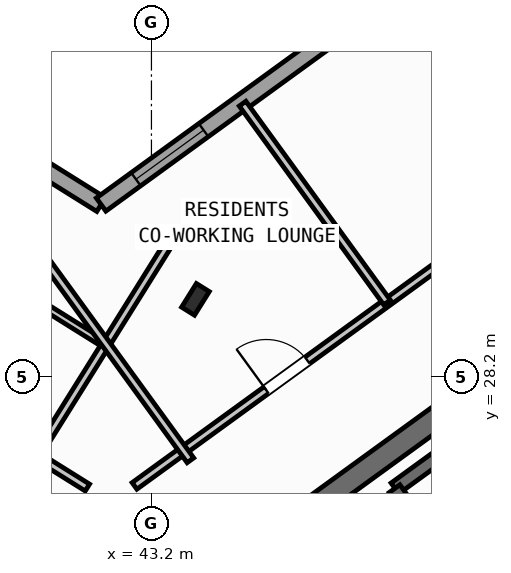
"""IFC4 building model, lengths in metres.
Left out: names, types, materials, properties, quantities, classifications, styles, units other than length and angle.
Written with IfcOpenShell. Run it as: python <this file> out.ifc"""

import sys

from ifc_helpers import new_model, si_unit, direction, frame, frame_2d, origin, origin_2d, place, context, subcontext, project, spatial, rectangle, i_section, extrude, source, transform, mapped, element, fill, save


model = new_model("IFC4")
c1 = context("Model", 3, precision=1e-05, world=origin(), true_north=direction((0.0, 1.0)))
c2 = subcontext(c1, "Body", "Model", "MODEL_VIEW")
j1 = project(units=[si_unit("LENGTHUNIT", "METRE"), si_unit("PLANEANGLEUNIT", "RADIAN")], contexts=[c1])
p1 = place(None, origin())
s1 = spatial("IfcSite", under=j1, at=p1, CompositionType="ELEMENT")
p2 = place(p1, origin())
s2 = spatial("IfcBuilding", under=s1, at=p2, CompositionType="ELEMENT")
p3 = place(p2, frame((0.0, 0.0, 229.2)))
s3 = spatial("IfcBuildingStorey", under=s2, at=p3, CompositionType="ELEMENT", Elevation=229.2)
p4 = place(p3, frame((44.406, 24.172, 0.0), z_axis=(0.0, 0.0, 1.0), x_axis=(0.809012867805, 0.587790931986, 0.0)))
e1 = element("IfcWall", 1, at=p4, inside=s3, PredefinedType="SHEAR", context=c2, shape_type="SweptSolid", body=[
    extrude(rectangle(XDim=12.24, YDim=0.45, at=frame_2d((6.12, 0.0))), origin(), (0.0, 0.0, 1.0), 4.22),
])
m1 = source(origin(), c2, "Body", "SweptSolid", [
    extrude(i_section(OverallWidth=0.3, OverallDepth=0.55, WebThickness=0.015, FlangeThickness=0.029, at=origin_2d()), origin(), (0.0, 0.0, 1.0), 4.5),
])
p5 = place(p3, frame((44.068, 29.726, 0.0), z_axis=(0.0, 0.0, 1.0), x_axis=(-0.848048096156, 0.529919264233, 0.0)))
e2 = element("IfcColumn", 2, at=p5, inside=s3, PredefinedType="COLUMN", context=c2, shape_type="MappedRepresentation", body=[
    mapped(m1, transform((0.0, 0.0, 0.0), scale=1.0)),
])
p6 = place(p3, frame((17.424, 47.083, 0.0), z_axis=(0.0, 0.0, 1.0), x_axis=(0.848049927979, -0.529916332693, 0.0)))
e3 = element("IfcWall", 3, at=p6, inside=s3, PredefinedType="STANDARD", context=c2, shape_type="SweptSolid", body=[
    extrude(rectangle(XDim=29.223, YDim=0.32, at=frame_2d((14.612, 0.0))), origin(), (0.0, 0.0, 1.0), 4.22),
])
p7 = place(p6, frame((3.709, 0.0, 0.0)))
e4 = element("IfcOpeningElement", 4, at=p7, cuts=e3, PredefinedType="OPENING", context=c2, shape_type="SweptSolid", body=[
    extrude(rectangle(XDim=1.05, YDim=2.15, at=frame_2d((0.525, 1.075))), frame((0.0, 0.17, 0.0), z_axis=(0.0, -1.0, 0.0), x_axis=(1.0, 0.0, 0.0)), (0.0, 0.0, 1.0), 0.34),
])
p8 = place(p6, frame((0.809, 0.0, 1.0)))
e5 = element("IfcOpeningElement", 5, at=p8, cuts=e3, PredefinedType="OPENING", context=c2, shape_type="SweptSolid", body=[
    extrude(rectangle(XDim=0.9, YDim=1.25, at=frame_2d((0.45, 0.625))), frame((0.0, 0.17, 0.0), z_axis=(0.0, -1.0, 0.0), x_axis=(1.0, 0.0, 0.0)), (0.0, 0.0, 1.0), 0.34),
])
p9 = place(p6, frame((13.811, 0.0, 0.9)))
e6 = element("IfcOpeningElement", 6, at=p9, cuts=e3, PredefinedType="OPENING", context=c2, shape_type="SweptSolid", body=[
    extrude(rectangle(XDim=1.35, YDim=1.45, at=frame_2d((0.675, 0.725))), frame((0.0, 0.17, 0.0), z_axis=(0.0, -1.0, 0.0), x_axis=(1.0, 0.0, 0.0)), (0.0, 0.0, 1.0), 0.34),
])
p10 = place(p6, frame((17.254, 0.0, 1.0)))
e7 = element("IfcOpeningElement", 7, at=p10, cuts=e3, PredefinedType="OPENING", context=c2, shape_type="SweptSolid", body=[
    extrude(rectangle(XDim=0.9, YDim=1.25, at=frame_2d((0.45, 0.625))), frame((0.0, 0.17, 0.0), z_axis=(0.0, -1.0, 0.0), x_axis=(1.0, 0.0, 0.0)), (0.0, 0.0, 1.0), 0.34),
])
p11 = place(p6, frame((21.364, 0.0, 1.0)))
e8 = element("IfcOpeningElement", 8, at=p11, cuts=e3, PredefinedType="OPENING", context=c2, shape_type="SweptSolid", body=[
    extrude(rectangle(XDim=0.9, YDim=1.25, at=frame_2d((0.45, 0.625))), frame((0.0, 0.17, 0.0), z_axis=(0.0, -1.0, 0.0), x_axis=(1.0, 0.0, 0.0)), (0.0, 0.0, 1.0), 0.34),
])
p12 = place(p6, frame((26.003, 0.0, 1.0)))
e9 = element("IfcOpeningElement", 9, at=p12, cuts=e3, PredefinedType="OPENING", context=c2, shape_type="SweptSolid", body=[
    extrude(rectangle(XDim=0.9, YDim=1.25, at=frame_2d((0.45, 0.625))), frame((0.0, 0.17, 0.0), z_axis=(0.0, -1.0, 0.0), x_axis=(1.0, 0.0, 0.0)), (0.0, 0.0, 1.0), 0.34),
])
p13 = place(p6, frame((11.211, 0.0, 1.0)))
e10 = element("IfcOpeningElement", 10, at=p13, cuts=e3, PredefinedType="OPENING", context=c2, shape_type="SweptSolid", body=[
    extrude(rectangle(XDim=0.65, YDim=1.15, at=frame_2d((0.325, 0.575))), frame((0.0, 0.17, 0.0), z_axis=(0.0, -1.0, 0.0), x_axis=(1.0, 0.0, 0.0)), (0.0, 0.0, 1.0), 0.34),
])
p14 = place(p6, frame((9.079, 0.0, 1.0)))
e11 = element("IfcOpeningElement", 11, at=p14, cuts=e3, PredefinedType="OPENING", context=c2, shape_type="SweptSolid", body=[
    extrude(rectangle(XDim=0.65, YDim=1.15, at=frame_2d((0.325, 0.575))), frame((0.0, 0.17, 0.0), z_axis=(0.0, -1.0, 0.0), x_axis=(1.0, 0.0, 0.0)), (0.0, 0.0, 1.0), 0.34),
])
p15 = place(p6, frame((6.951, 0.0, 1.0)))
e12 = element("IfcOpeningElement", 12, at=p15, cuts=e3, PredefinedType="OPENING", context=c2, shape_type="SweptSolid", body=[
    extrude(rectangle(XDim=0.65, YDim=1.15, at=frame_2d((0.325, 0.575))), frame((0.0, 0.17, 0.0), z_axis=(0.0, -1.0, 0.0), x_axis=(1.0, 0.0, 0.0)), (0.0, 0.0, 1.0), 0.34),
])
p16 = place(p3, frame((42.207, 31.597, 0.0), z_axis=(0.0, 0.0, 1.0), x_axis=(0.809020333377, 0.587780656523, 0.0)))
e13 = element("IfcWall", 13, at=p16, inside=s3, PredefinedType="STANDARD", context=c2, shape_type="SweptSolid", body=[
    extrude(rectangle(XDim=15.223, YDim=0.32, at=frame_2d((7.611, 0.0))), origin(), (0.0, 0.0, 1.0), 4.22),
])
p17 = place(p16, frame((12.82, 0.0, 0.0)))
e14 = element("IfcOpeningElement", 14, at=p17, cuts=e13, PredefinedType="OPENING", context=c2, shape_type="SweptSolid", body=[
    extrude(rectangle(XDim=1.05, YDim=2.15, at=frame_2d((0.525, 1.075))), frame((0.0, 0.17, 0.0), z_axis=(0.0, -1.0, 0.0), x_axis=(1.0, 0.0, 0.0)), (0.0, 0.0, 1.0), 0.34),
])
p18 = place(p16, frame((0.85, 0.0, 0.9)))
e15 = element("IfcOpeningElement", 15, at=p18, cuts=e13, PredefinedType="OPENING", context=c2, shape_type="SweptSolid", body=[
    extrude(rectangle(XDim=1.65, YDim=1.45, at=frame_2d((0.825, 0.725))), frame((0.0, 0.17, 0.0), z_axis=(0.0, -1.0, 0.0), x_axis=(1.0, 0.0, 0.0)), (0.0, 0.0, 1.0), 0.34),
])
p19 = place(p16, frame((5.769, 0.0, 0.9)))
e16 = element("IfcOpeningElement", 16, at=p19, cuts=e13, PredefinedType="OPENING", context=c2, shape_type="SweptSolid", body=[
    extrude(rectangle(XDim=1.35, YDim=1.45, at=frame_2d((0.675, 0.725))), frame((0.0, 0.17, 0.0), z_axis=(0.0, -1.0, 0.0), x_axis=(1.0, 0.0, 0.0)), (0.0, 0.0, 1.0), 0.34),
])
p20 = place(p16, frame((10.219, 0.0, 1.0)))
e17 = element("IfcOpeningElement", 17, at=p20, cuts=e13, PredefinedType="OPENING", context=c2, shape_type="SweptSolid", body=[
    extrude(rectangle(XDim=0.9, YDim=1.25, at=frame_2d((0.45, 0.625))), frame((0.0, 0.17, 0.0), z_axis=(0.0, -1.0, 0.0), x_axis=(1.0, 0.0, 0.0)), (0.0, 0.0, 1.0), 0.34),
])
p21 = place(p3, frame((48.006, 25.996, 0.0), z_axis=(0.0, 0.0, 1.0), x_axis=(0.80901903764, 0.587782439969, 0.0)))
e18 = element("IfcWall", 18, at=p21, inside=s3, PredefinedType="SHEAR", context=c2, shape_type="SweptSolid", body=[
    extrude(rectangle(XDim=7.46, YDim=0.26, at=frame_2d((3.73, 0.0))), origin(), (0.0, 0.0, 1.0), 4.22),
])
p22 = place(p3, frame((49.855, 23.434, 0.0), z_axis=(0.0, 0.0, 1.0), x_axis=(-0.58776738483, 0.809029975545, 0.0)))
e19 = element("IfcWall", 19, at=p22, inside=s3, PredefinedType="SHEAR", context=c2, shape_type="SweptSolid", body=[
    extrude(rectangle(XDim=3.16, YDim=0.26, at=frame_2d((1.58, 0.0))), origin(), (0.0, 0.0, 1.0), 4.22),
])
p23 = place(p3, frame((41.936, 26.012, 0.0), z_axis=(0.0, 0.0, 1.0), x_axis=(-0.848051154596, 0.529914369676, 0.0)))
e20 = element("IfcWall", 20, at=p23, inside=s3, PredefinedType="PARTITIONING", context=c2, shape_type="SweptSolid", body=[
    extrude(rectangle(XDim=15.57, YDim=0.16, at=frame_2d((7.785, 0.0))), origin(), (0.0, 0.0, 1.0), 4.21),
])
p24 = place(p23, frame((10.83, 0.0, 0.0)))
e21 = element("IfcOpeningElement", 21, at=p24, cuts=e20, PredefinedType="OPENING", context=c2, shape_type="SweptSolid", body=[
    extrude(rectangle(XDim=1.0, YDim=2.1, at=frame_2d((0.5, 1.05))), frame((0.0, 0.09, 0.0), z_axis=(0.0, -1.0, 0.0), x_axis=(1.0, 0.0, 0.0)), (0.0, 0.0, 1.0), 0.18),
])
p25 = place(p3, frame((43.704, 31.086, 0.0), z_axis=(0.0, 0.0, 1.0), x_axis=(-0.529906828443, -0.848055866774, 0.0)))
e22 = element("IfcWall", 22, at=p25, inside=s3, PredefinedType="PARTITIONING", context=c2, shape_type="SweptSolid", body=[
    extrude(rectangle(XDim=5.48, YDim=0.16, at=frame_2d((2.74, 0.0))), origin(), (0.0, 0.0, 1.0), 4.21),
])
p26 = place(p3, frame((42.226, 28.873, 0.0), z_axis=(0.0, 0.0, 1.0), x_axis=(-0.848049134363, 0.529917602752, 0.0)))
e23 = element("IfcWall", 23, at=p26, inside=s3, PredefinedType="PLUMBINGWALL", context=c2, shape_type="SweptSolid", body=[
    extrude(rectangle(XDim=14.3, YDim=0.14, at=frame_2d((7.15, 0.0))), origin(), (0.0, 0.0, 1.0), 4.21),
])
p27 = place(p26, frame((9.57, 0.0, 0.0)))
e24 = element("IfcOpeningElement", 24, at=p27, cuts=e23, PredefinedType="OPENING", context=c2, shape_type="SweptSolid", body=[
    extrude(rectangle(XDim=0.92, YDim=2.08, at=frame_2d((0.46, 1.04))), frame((0.0, 0.08, 0.0), z_axis=(0.0, -1.0, 0.0), x_axis=(1.0, 0.0, 0.0)), (0.0, 0.0, 1.0), 0.16),
])
p28 = place(p3, frame((42.866, 26.044, 0.0), z_axis=(0.0, 0.0, 1.0), x_axis=(0.809020254154, 0.587780765566, 0.0)))
e25 = element("IfcWall", 25, at=p28, inside=s3, PredefinedType="PARTITIONING", context=c2, shape_type="SweptSolid", body=[
    extrude(rectangle(XDim=14.67, YDim=0.16, at=frame_2d((7.335, 0.0))), origin(), (0.0, 0.0, 1.0), 4.21),
])
p29 = place(p28, frame((3.215, 0.0, 0.0)))
e26 = element("IfcOpeningElement", 26, at=p29, cuts=e25, PredefinedType="OPENING", context=c2, shape_type="SweptSolid", body=[
    extrude(rectangle(XDim=1.0, YDim=2.1, at=frame_2d((0.5, 1.05))), frame((0.0, 0.09, 0.0), z_axis=(0.0, -1.0, 0.0), x_axis=(1.0, 0.0, 0.0)), (0.0, 0.0, 1.0), 0.18),
])
p30 = place(p28, frame((9.915, 0.0, 0.0)))
e27 = element("IfcOpeningElement", 27, at=p30, cuts=e25, PredefinedType="OPENING", context=c2, shape_type="SweptSolid", body=[
    extrude(rectangle(XDim=1.0, YDim=2.1, at=frame_2d((0.5, 1.05))), frame((0.0, 0.09, 0.0), z_axis=(0.0, -1.0, 0.0), x_axis=(1.0, 0.0, 0.0)), (0.0, 0.0, 1.0), 0.18),
])
p31 = place(p3, frame((43.969, 26.55, 0.0), z_axis=(0.0, 0.0, 1.0), x_axis=(-0.587776919386, 0.80902304852, 0.0)))
e28 = element("IfcWall", 28, at=p31, inside=s3, PredefinedType="PARTITIONING", context=c2, shape_type="SweptSolid", body=[
    extrude(rectangle(XDim=5.48, YDim=0.16, at=frame_2d((2.74, 0.0))), origin(), (0.0, 0.0, 1.0), 4.21),
])
p32 = place(p3, frame((47.849, 29.665, 0.0), z_axis=(0.0, 0.0, 1.0), x_axis=(-0.587785532001, 0.809016791155, 0.0)))
e29 = element("IfcWall", 29, at=p32, inside=s3, PredefinedType="PARTITIONING", context=c2, shape_type="SweptSolid", body=[
    extrude(rectangle(XDim=4.85, YDim=0.16, at=frame_2d((2.425, 0.0))), origin(), (0.0, 0.0, 1.0), 4.21),
])
m2 = source(origin(), c2, "Body", "SweptSolid", [
    extrude(rectangle(XDim=1.65, YDim=1.45, at=frame_2d((0.825, 0.725))), frame((0.0, 0.03, 0.0), z_axis=(0.0, -1.0, 0.0), x_axis=(1.0, 0.0, 0.0)), (0.0, 0.0, 1.0), 0.06),
])
p33 = place(p18, origin())
e30 = element("IfcWindow", 30, at=p33, inside=s3, PartitioningType="SINGLE_PANEL", PredefinedType="WINDOW", context=c2, shape_type="MappedRepresentation", body=[
    mapped(m2, transform((0.0, 0.0, 0.0), scale=1.0)),
])
fill(e15, e30)
m3 = source(origin(), c2, "Body", "SweptSolid", [
    extrude(rectangle(XDim=1.0, YDim=2.1, at=frame_2d((0.5, 1.05))), frame((0.0, 0.025, 0.0), z_axis=(0.0, -1.0, 0.0), x_axis=(1.0, 0.0, 0.0)), (0.0, 0.0, 1.0), 0.05),
])
p34 = place(p29, origin())
e31 = element("IfcDoor", 31, at=p34, inside=s3, OperationType="SINGLE_SWING_LEFT", PredefinedType="DOOR", context=c2, shape_type="MappedRepresentation", body=[
    mapped(m3, transform((0.0, 0.0, 0.0), scale=1.0)),
])
fill(e26, e31)
save(model, sys.argv[1])
